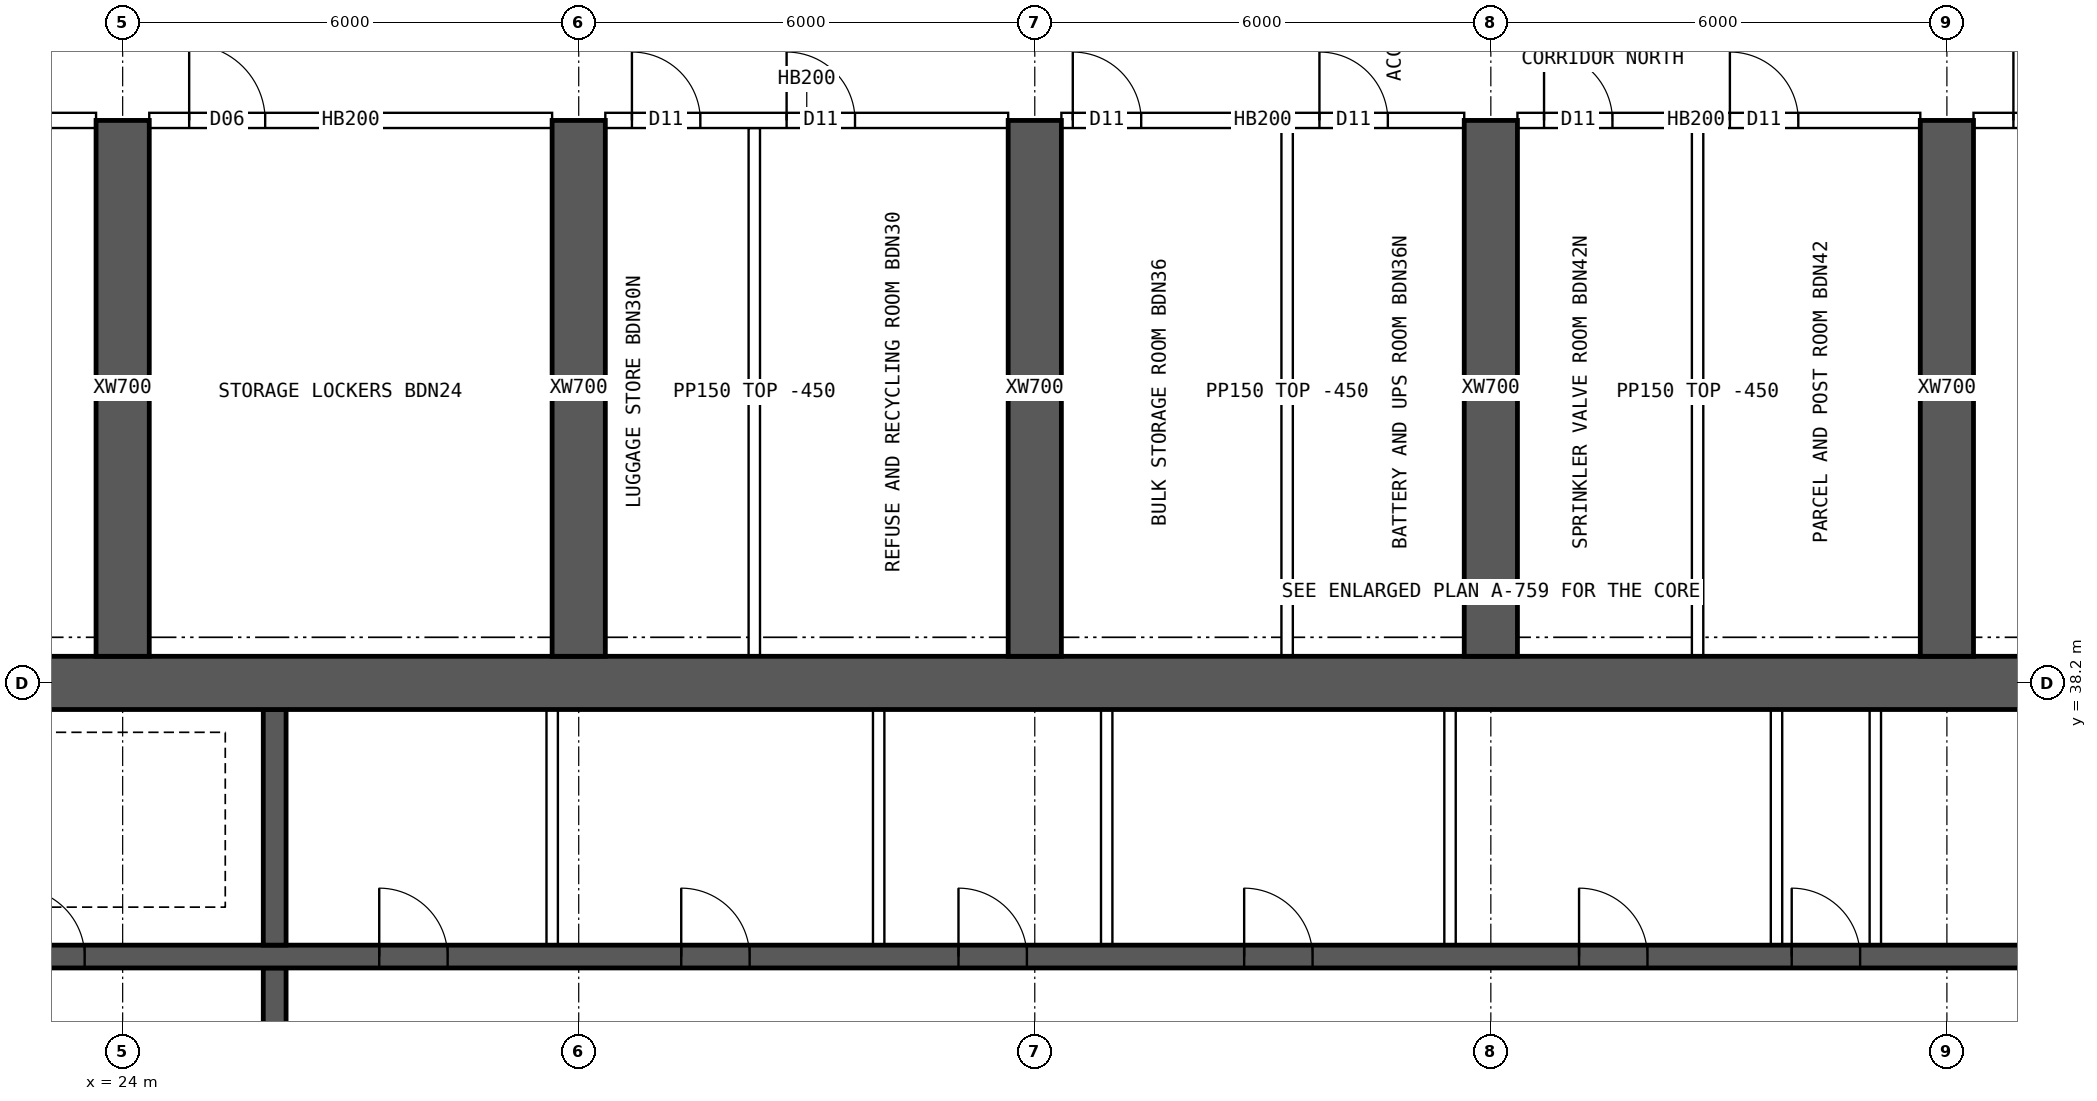
"""IFC4 building model, lengths in metres.
Left out: names, types, materials, properties, quantities, classifications, styles, units other than length and angle.
Written with IfcOpenShell. Run it as: python <this file> out.ifc"""

import sys

from ifc_helpers import new_model, si_unit, direction, frame, frame_2d, origin, place, context, subcontext, project, spatial, rectangle, extrude, element, fill, save


model = new_model("IFC4")
c1 = context("Model", 3, precision=1e-05, world=origin(), true_north=direction((0.0, 1.0)))
c2 = subcontext(c1, "Body", "Model", "MODEL_VIEW")
j1 = project(units=[si_unit("LENGTHUNIT", "METRE"), si_unit("PLANEANGLEUNIT", "RADIAN")], contexts=[c1])
p1 = place(None, origin())
s1 = spatial("IfcSite", under=j1, at=p1, CompositionType="ELEMENT")
p2 = place(p1, origin())
s2 = spatial("IfcBuilding", under=s1, at=p2, CompositionType="ELEMENT")
p3 = place(p2, frame((0.0, 0.0, 227.8)))
s3 = spatial("IfcBuildingStorey", under=s2, at=p3, CompositionType="ELEMENT", Elevation=227.8)
p4 = place(p3, frame((18.0, 38.2, 0.0), z_axis=(0.0, 0.0, 1.0), x_axis=(1.0, 0.0, 0.0)))
e1 = element("IfcWall", 1, at=p4, inside=s3, PredefinedType="SHEAR", context=c2, shape_type="SweptSolid", body=[
    extrude(rectangle(XDim=48.0, YDim=0.7, at=frame_2d((24.0, 0.0))), origin(), (0.0, 0.0, 1.0), 3.75),
])
p5 = place(p3, frame((18.35, 34.6, 0.0), z_axis=(0.0, 0.0, 1.0), x_axis=(1.0, 0.0, 0.0)))
e2 = element("IfcWall", 2, at=p5, inside=s3, PredefinedType="SHEAR", context=c2, shape_type="SweptSolid", body=[
    extrude(rectangle(XDim=47.3, YDim=0.3, at=frame_2d((23.65, 0.0))), origin(), (0.0, 0.0, 1.0), 3.75),
])
p6 = place(p5, frame((0.9, 0.0, 0.0)))
e3 = element("IfcOpeningElement", 3, at=p6, cuts=e2, PredefinedType="OPENING", context=c2, shape_type="SweptSolid", body=[
    extrude(rectangle(XDim=1.1, YDim=2.1, at=frame_2d((0.55, 1.05))), frame((0.0, 0.16, 0.0), z_axis=(0.0, -1.0, 0.0), x_axis=(1.0, 0.0, 0.0)), (0.0, 0.0, 1.0), 0.32),
])
p7 = place(p5, frame((45.3, 0.0, 0.0)))
e4 = element("IfcOpeningElement", 4, at=p7, cuts=e2, PredefinedType="OPENING", context=c2, shape_type="SweptSolid", body=[
    extrude(rectangle(XDim=1.1, YDim=2.1, at=frame_2d((0.55, 1.05))), frame((0.0, 0.16, 0.0), z_axis=(0.0, -1.0, 0.0), x_axis=(1.0, 0.0, 0.0)), (0.0, 0.0, 1.0), 0.32),
])
p8 = place(p5, frame((4.25, 0.0, 0.0)))
e5 = element("IfcOpeningElement", 5, at=p8, cuts=e2, PredefinedType="OPENING", context=c2, shape_type="SweptSolid", body=[
    extrude(rectangle(XDim=0.9, YDim=2.1, at=frame_2d((0.45, 1.05))), frame((0.0, 0.16, 0.0), z_axis=(0.0, -1.0, 0.0), x_axis=(1.0, 0.0, 0.0)), (0.0, 0.0, 1.0), 0.32),
])
p9 = place(p5, frame((42.15, 0.0, 0.0)))
e6 = element("IfcOpeningElement", 6, at=p9, cuts=e2, PredefinedType="OPENING", context=c2, shape_type="SweptSolid", body=[
    extrude(rectangle(XDim=0.9, YDim=2.1, at=frame_2d((0.45, 1.05))), frame((0.0, 0.16, 0.0), z_axis=(0.0, -1.0, 0.0), x_axis=(1.0, 0.0, 0.0)), (0.0, 0.0, 1.0), 0.32),
])
p10 = place(p5, frame((9.025, 0.0, 0.0)))
e7 = element("IfcOpeningElement", 7, at=p10, cuts=e2, PredefinedType="OPENING", context=c2, shape_type="SweptSolid", body=[
    extrude(rectangle(XDim=0.9, YDim=2.1, at=frame_2d((0.45, 1.05))), frame((0.0, 0.16, 0.0), z_axis=(0.0, -1.0, 0.0), x_axis=(1.0, 0.0, 0.0)), (0.0, 0.0, 1.0), 0.32),
])
p11 = place(p5, frame((12.999, 0.0, 0.0)))
e8 = element("IfcOpeningElement", 8, at=p11, cuts=e2, PredefinedType="OPENING", context=c2, shape_type="SweptSolid", body=[
    extrude(rectangle(XDim=0.9, YDim=2.1, at=frame_2d((0.45, 1.05))), frame((0.0, 0.16, 0.0), z_axis=(0.0, -1.0, 0.0), x_axis=(1.0, 0.0, 0.0)), (0.0, 0.0, 1.0), 0.32),
])
p12 = place(p5, frame((16.646, 0.0, 0.0)))
e9 = element("IfcOpeningElement", 9, at=p12, cuts=e2, PredefinedType="OPENING", context=c2, shape_type="SweptSolid", body=[
    extrude(rectangle(XDim=0.9, YDim=2.1, at=frame_2d((0.45, 1.05))), frame((0.0, 0.16, 0.0), z_axis=(0.0, -1.0, 0.0), x_axis=(1.0, 0.0, 0.0)), (0.0, 0.0, 1.0), 0.32),
])
p13 = place(p5, frame((20.405, 0.0, 0.0)))
e10 = element("IfcOpeningElement", 10, at=p13, cuts=e2, PredefinedType="OPENING", context=c2, shape_type="SweptSolid", body=[
    extrude(rectangle(XDim=0.9, YDim=2.1, at=frame_2d((0.45, 1.05))), frame((0.0, 0.16, 0.0), z_axis=(0.0, -1.0, 0.0), x_axis=(1.0, 0.0, 0.0)), (0.0, 0.0, 1.0), 0.32),
])
p14 = place(p5, frame((24.811, 0.0, 0.0)))
e11 = element("IfcOpeningElement", 11, at=p14, cuts=e2, PredefinedType="OPENING", context=c2, shape_type="SweptSolid", body=[
    extrude(rectangle(XDim=0.9, YDim=2.1, at=frame_2d((0.45, 1.05))), frame((0.0, 0.16, 0.0), z_axis=(0.0, -1.0, 0.0), x_axis=(1.0, 0.0, 0.0)), (0.0, 0.0, 1.0), 0.32),
])
p15 = place(p5, frame((27.608, 0.0, 0.0)))
e12 = element("IfcOpeningElement", 12, at=p15, cuts=e2, PredefinedType="OPENING", context=c2, shape_type="SweptSolid", body=[
    extrude(rectangle(XDim=0.9, YDim=2.1, at=frame_2d((0.45, 1.05))), frame((0.0, 0.16, 0.0), z_axis=(0.0, -1.0, 0.0), x_axis=(1.0, 0.0, 0.0)), (0.0, 0.0, 1.0), 0.32),
])
p16 = place(p5, frame((33.729, 0.0, 0.0)))
e13 = element("IfcOpeningElement", 13, at=p16, cuts=e2, PredefinedType="OPENING", context=c2, shape_type="SweptSolid", body=[
    extrude(rectangle(XDim=0.9, YDim=2.1, at=frame_2d((0.45, 1.05))), frame((0.0, 0.16, 0.0), z_axis=(0.0, -1.0, 0.0), x_axis=(1.0, 0.0, 0.0)), (0.0, 0.0, 1.0), 0.32),
])
p17 = place(p3, frame((26.0, 30.55, 0.0), z_axis=(0.0, 0.0, 1.0), x_axis=(0.0, 1.0, 0.0)))
e14 = element("IfcWall", 14, at=p17, inside=s3, PredefinedType="SHEAR", context=c2, shape_type="SweptSolid", body=[
    extrude(rectangle(XDim=3.9, YDim=0.3, at=frame_2d((1.95, 0.0))), origin(), (0.0, 0.0, 1.0), 3.75),
])
p18 = place(p17, frame((1.4, 0.0, 0.0)))
e15 = element("IfcOpeningElement", 15, at=p18, cuts=e14, PredefinedType="OPENING", context=c2, shape_type="SweptSolid", body=[
    extrude(rectangle(XDim=1.2, YDim=2.1, at=frame_2d((0.6, 1.05))), frame((0.0, 0.16, 0.0), z_axis=(0.0, -1.0, 0.0), x_axis=(1.0, 0.0, 0.0)), (0.0, 0.0, 1.0), 0.32),
])
p19 = place(p3, frame((26.0, 34.75, 0.0), z_axis=(0.0, 0.0, 1.0), x_axis=(0.0, 1.0, 0.0)))
e16 = element("IfcWall", 16, at=p19, inside=s3, PredefinedType="SHEAR", context=c2, shape_type="SweptSolid", body=[
    extrude(rectangle(XDim=3.1, YDim=0.3, at=frame_2d((1.55, 0.0))), origin(), (0.0, 0.0, 1.0), 3.75),
])
for number, where, z_axis, x_axis in (
    (17, (24.0, 38.55, 0.0), (0.0, 0.0, 1.0), (0.0, 1.0, 0.0)),
    (18, (30.0, 38.55, 0.0), (0.0, 0.0, 1.0), (0.0, 1.0, 0.0)),
    (19, (36.0, 38.55, 0.0), (0.0, 0.0, 1.0), (0.0, 1.0, 0.0)),
    (20, (42.0, 38.55, 0.0), (0.0, 0.0, 1.0), (0.0, 1.0, 0.0)),
    (21, (48.0, 38.55, 0.0), (0.0, 0.0, 1.0), (0.0, 1.0, 0.0)),
):
    element("IfcWall", number, at=place(p3, frame(where, z_axis=z_axis, x_axis=x_axis)), inside=s3, PredefinedType="SHEAR", context=c2, shape_type="SweptSolid", body=[
        extrude(rectangle(XDim=7.05, YDim=0.7, at=frame_2d((3.525, 0.0))), origin(), (0.0, 0.0, 1.0), 3.75),
    ])
for number, where, z_axis, x_axis in (
    (22, (29.651, 34.75, 0.0), (0.0, 0.0, 1.0), (0.0, 1.0, 0.0)),
    (23, (33.946, 34.75, 0.0), (0.0, 0.0, 1.0), (0.0, 1.0, 0.0)),
    (24, (36.946, 34.75, 0.0), (0.0, 0.0, 1.0), (0.0, 1.0, 0.0)),
    (25, (41.463, 34.75, 0.0), (0.0, 0.0, 1.0), (0.0, 1.0, 0.0)),
    (26, (45.758, 34.75, 0.0), (0.0, 0.0, 1.0), (0.0, 1.0, 0.0)),
    (27, (47.058, 34.75, 0.0), (0.0, 0.0, 1.0), (0.0, 1.0, 0.0)),
):
    element("IfcWall", number, at=place(p3, frame(where, z_axis=z_axis, x_axis=x_axis)), inside=s3, PredefinedType="SOLIDWALL", context=c2, shape_type="SweptSolid", body=[
        extrude(rectangle(XDim=3.1, YDim=0.15, at=frame_2d((1.55, 0.0))), origin(), (0.0, 0.0, 1.0), 3.3),
    ])
p20 = place(p3, frame((18.35, 45.6, 0.0), z_axis=(0.0, 0.0, 1.0), x_axis=(1.0, 0.0, 0.0)))
e28 = element("IfcWall", 28, at=p20, inside=s3, PredefinedType="SOLIDWALL", context=c2, shape_type="SweptSolid", body=[
    extrude(rectangle(XDim=5.3, YDim=0.2, at=frame_2d((2.65, 0.0))), origin(), (0.0, 0.0, 1.0), 3.3),
])
p21 = place(p20, frame((0.8, 0.0, 0.0)))
e29 = element("IfcOpeningElement", 29, at=p21, cuts=e28, PredefinedType="OPENING", context=c2, shape_type="SweptSolid", body=[
    extrude(rectangle(XDim=1.0, YDim=2.1, at=frame_2d((0.5, 1.05))), frame((0.0, 0.11, 0.0), z_axis=(0.0, -1.0, 0.0), x_axis=(1.0, 0.0, 0.0)), (0.0, 0.0, 1.0), 0.22),
])
p22 = place(p3, frame((24.35, 45.6, 0.0), z_axis=(0.0, 0.0, 1.0), x_axis=(1.0, 0.0, 0.0)))
e30 = element("IfcWall", 30, at=p22, inside=s3, PredefinedType="SOLIDWALL", context=c2, shape_type="SweptSolid", body=[
    extrude(rectangle(XDim=5.3, YDim=0.2, at=frame_2d((2.65, 0.0))), origin(), (0.0, 0.0, 1.0), 3.3),
])
p23 = place(p22, frame((0.525, 0.0, 0.0)))
e31 = element("IfcOpeningElement", 31, at=p23, cuts=e30, PredefinedType="OPENING", context=c2, shape_type="SweptSolid", body=[
    extrude(rectangle(XDim=1.0, YDim=2.1, at=frame_2d((0.5, 1.05))), frame((0.0, 0.11, 0.0), z_axis=(0.0, -1.0, 0.0), x_axis=(1.0, 0.0, 0.0)), (0.0, 0.0, 1.0), 0.22),
])
p24 = place(p3, frame((30.35, 45.6, 0.0), z_axis=(0.0, 0.0, 1.0), x_axis=(1.0, 0.0, 0.0)))
e32 = element("IfcWall", 32, at=p24, inside=s3, PredefinedType="SOLIDWALL", context=c2, shape_type="SweptSolid", body=[
    extrude(rectangle(XDim=5.3, YDim=0.2, at=frame_2d((2.65, 0.0))), origin(), (0.0, 0.0, 1.0), 3.3),
])
p25 = place(p24, frame((0.35, 0.0, 0.0)))
e33 = element("IfcOpeningElement", 33, at=p25, cuts=e32, PredefinedType="OPENING", context=c2, shape_type="SweptSolid", body=[
    extrude(rectangle(XDim=0.9, YDim=2.1, at=frame_2d((0.45, 1.05))), frame((0.0, 0.11, 0.0), z_axis=(0.0, -1.0, 0.0), x_axis=(1.0, 0.0, 0.0)), (0.0, 0.0, 1.0), 0.22),
])
p26 = place(p24, frame((2.385, 0.0, 0.0)))
e34 = element("IfcOpeningElement", 34, at=p26, cuts=e32, PredefinedType="OPENING", context=c2, shape_type="SweptSolid", body=[
    extrude(rectangle(XDim=0.9, YDim=2.1, at=frame_2d((0.45, 1.05))), frame((0.0, 0.11, 0.0), z_axis=(0.0, -1.0, 0.0), x_axis=(1.0, 0.0, 0.0)), (0.0, 0.0, 1.0), 0.22),
])
p27 = place(p3, frame((36.35, 45.6, 0.0), z_axis=(0.0, 0.0, 1.0), x_axis=(1.0, 0.0, 0.0)))
e35 = element("IfcWall", 35, at=p27, inside=s3, PredefinedType="SOLIDWALL", context=c2, shape_type="SweptSolid", body=[
    extrude(rectangle(XDim=5.3, YDim=0.2, at=frame_2d((2.65, 0.0))), origin(), (0.0, 0.0, 1.0), 3.3),
])
p28 = place(p27, frame((0.15, 0.0, 0.0)))
e36 = element("IfcOpeningElement", 36, at=p28, cuts=e35, PredefinedType="OPENING", context=c2, shape_type="SweptSolid", body=[
    extrude(rectangle(XDim=0.9, YDim=2.1, at=frame_2d((0.45, 1.05))), frame((0.0, 0.11, 0.0), z_axis=(0.0, -1.0, 0.0), x_axis=(1.0, 0.0, 0.0)), (0.0, 0.0, 1.0), 0.22),
])
p29 = place(p27, frame((3.395, 0.0, 0.0)))
e37 = element("IfcOpeningElement", 37, at=p29, cuts=e35, PredefinedType="OPENING", context=c2, shape_type="SweptSolid", body=[
    extrude(rectangle(XDim=0.9, YDim=2.1, at=frame_2d((0.45, 1.05))), frame((0.0, 0.11, 0.0), z_axis=(0.0, -1.0, 0.0), x_axis=(1.0, 0.0, 0.0)), (0.0, 0.0, 1.0), 0.22),
])
p30 = place(p3, frame((42.35, 45.6, 0.0), z_axis=(0.0, 0.0, 1.0), x_axis=(1.0, 0.0, 0.0)))
e38 = element("IfcWall", 38, at=p30, inside=s3, PredefinedType="SOLIDWALL", context=c2, shape_type="SweptSolid", body=[
    extrude(rectangle(XDim=5.3, YDim=0.2, at=frame_2d((2.65, 0.0))), origin(), (0.0, 0.0, 1.0), 3.3),
])
p31 = place(p30, frame((0.35, 0.0, 0.0)))
e39 = element("IfcOpeningElement", 39, at=p31, cuts=e38, PredefinedType="OPENING", context=c2, shape_type="SweptSolid", body=[
    extrude(rectangle(XDim=0.9, YDim=2.1, at=frame_2d((0.45, 1.05))), frame((0.0, 0.11, 0.0), z_axis=(0.0, -1.0, 0.0), x_axis=(1.0, 0.0, 0.0)), (0.0, 0.0, 1.0), 0.22),
])
p32 = place(p30, frame((2.795, 0.0, 0.0)))
e40 = element("IfcOpeningElement", 40, at=p32, cuts=e38, PredefinedType="OPENING", context=c2, shape_type="SweptSolid", body=[
    extrude(rectangle(XDim=0.9, YDim=2.1, at=frame_2d((0.45, 1.05))), frame((0.0, 0.11, 0.0), z_axis=(0.0, -1.0, 0.0), x_axis=(1.0, 0.0, 0.0)), (0.0, 0.0, 1.0), 0.22),
])
p33 = place(p3, frame((48.35, 45.6, 0.0), z_axis=(0.0, 0.0, 1.0), x_axis=(1.0, 0.0, 0.0)))
e41 = element("IfcWall", 41, at=p33, inside=s3, PredefinedType="SOLIDWALL", context=c2, shape_type="SweptSolid", body=[
    extrude(rectangle(XDim=5.3, YDim=0.2, at=frame_2d((2.65, 0.0))), origin(), (0.0, 0.0, 1.0), 3.3),
])
p34 = place(p33, frame((0.525, 0.0, 0.0)))
e42 = element("IfcOpeningElement", 42, at=p34, cuts=e41, PredefinedType="OPENING", context=c2, shape_type="SweptSolid", body=[
    extrude(rectangle(XDim=1.0, YDim=2.1, at=frame_2d((0.5, 1.05))), frame((0.0, 0.11, 0.0), z_axis=(0.0, -1.0, 0.0), x_axis=(1.0, 0.0, 0.0)), (0.0, 0.0, 1.0), 0.22),
])
for number, where, z_axis, x_axis in (
    (43, (32.31, 38.55, 0.0), (0.0, 0.0, 1.0), (0.0, 1.0, 0.0)),
    (44, (39.32, 38.55, 0.0), (0.0, 0.0, 1.0), (0.0, 1.0, 0.0)),
    (45, (44.72, 38.55, 0.0), (0.0, 0.0, 1.0), (0.0, 1.0, 0.0)),
):
    element("IfcWall", number, at=place(p3, frame(where, z_axis=z_axis, x_axis=x_axis)), inside=s3, PredefinedType="PARTITIONING", context=c2, shape_type="SweptSolid", body=[
        extrude(rectangle(XDim=6.95, YDim=0.15, at=frame_2d((3.475, 0.0))), origin(), (0.0, 0.0, 1.0), 3.3),
    ])
p35 = place(p8, origin())
e46 = element("IfcDoor", 46, at=p35, inside=s3, OperationType="SINGLE_SWING_LEFT", PredefinedType="DOOR", context=c2, shape_type="SweptSolid", body=[
    extrude(rectangle(XDim=0.9, YDim=2.1, at=frame_2d((0.45, 1.05))), frame((0.0, 0.025, 0.0), z_axis=(0.0, -1.0, 0.0), x_axis=(1.0, 0.0, 0.0)), (0.0, 0.0, 1.0), 0.05),
])
fill(e5, e46)
p36 = place(p10, origin())
e47 = element("IfcDoor", 47, at=p36, inside=s3, OperationType="SINGLE_SWING_LEFT", PredefinedType="DOOR", context=c2, shape_type="SweptSolid", body=[
    extrude(rectangle(XDim=0.9, YDim=2.1, at=frame_2d((0.45, 1.05))), frame((0.0, 0.025, 0.0), z_axis=(0.0, -1.0, 0.0), x_axis=(1.0, 0.0, 0.0)), (0.0, 0.0, 1.0), 0.05),
])
fill(e7, e47)
p37 = place(p11, origin())
e48 = element("IfcDoor", 48, at=p37, inside=s3, OperationType="SINGLE_SWING_LEFT", PredefinedType="DOOR", context=c2, shape_type="SweptSolid", body=[
    extrude(rectangle(XDim=0.9, YDim=2.1, at=frame_2d((0.45, 1.05))), frame((0.0, 0.025, 0.0), z_axis=(0.0, -1.0, 0.0), x_axis=(1.0, 0.0, 0.0)), (0.0, 0.0, 1.0), 0.05),
])
fill(e8, e48)
p38 = place(p12, origin())
e49 = element("IfcDoor", 49, at=p38, inside=s3, OperationType="SINGLE_SWING_LEFT", PredefinedType="DOOR", context=c2, shape_type="SweptSolid", body=[
    extrude(rectangle(XDim=0.9, YDim=2.1, at=frame_2d((0.45, 1.05))), frame((0.0, 0.025, 0.0), z_axis=(0.0, -1.0, 0.0), x_axis=(1.0, 0.0, 0.0)), (0.0, 0.0, 1.0), 0.05),
])
fill(e9, e49)
p39 = place(p13, origin())
e50 = element("IfcDoor", 50, at=p39, inside=s3, OperationType="SINGLE_SWING_LEFT", PredefinedType="DOOR", context=c2, shape_type="SweptSolid", body=[
    extrude(rectangle(XDim=0.9, YDim=2.1, at=frame_2d((0.45, 1.05))), frame((0.0, 0.025, 0.0), z_axis=(0.0, -1.0, 0.0), x_axis=(1.0, 0.0, 0.0)), (0.0, 0.0, 1.0), 0.05),
])
fill(e10, e50)
p40 = place(p14, origin())
e51 = element("IfcDoor", 51, at=p40, inside=s3, OperationType="SINGLE_SWING_LEFT", PredefinedType="DOOR", context=c2, shape_type="SweptSolid", body=[
    extrude(rectangle(XDim=0.9, YDim=2.1, at=frame_2d((0.45, 1.05))), frame((0.0, 0.025, 0.0), z_axis=(0.0, -1.0, 0.0), x_axis=(1.0, 0.0, 0.0)), (0.0, 0.0, 1.0), 0.05),
])
fill(e11, e51)
p41 = place(p15, origin())
e52 = element("IfcDoor", 52, at=p41, inside=s3, OperationType="SINGLE_SWING_LEFT", PredefinedType="DOOR", context=c2, shape_type="SweptSolid", body=[
    extrude(rectangle(XDim=0.9, YDim=2.1, at=frame_2d((0.45, 1.05))), frame((0.0, 0.025, 0.0), z_axis=(0.0, -1.0, 0.0), x_axis=(1.0, 0.0, 0.0)), (0.0, 0.0, 1.0), 0.05),
])
fill(e12, e52)
p42 = place(p23, origin())
e53 = element("IfcDoor", 53, at=p42, inside=s3, OperationType="SINGLE_SWING_LEFT", PredefinedType="DOOR", context=c2, shape_type="SweptSolid", body=[
    extrude(rectangle(XDim=1.0, YDim=2.1, at=frame_2d((0.5, 1.05))), frame((0.0, 0.025, 0.0), z_axis=(0.0, -1.0, 0.0), x_axis=(1.0, 0.0, 0.0)), (0.0, 0.0, 1.0), 0.05),
])
fill(e31, e53)
p43 = place(p25, origin())
e54 = element("IfcDoor", 54, at=p43, inside=s3, OperationType="SINGLE_SWING_LEFT", PredefinedType="DOOR", context=c2, shape_type="SweptSolid", body=[
    extrude(rectangle(XDim=0.9, YDim=2.1, at=frame_2d((0.45, 1.05))), frame((0.0, 0.025, 0.0), z_axis=(0.0, -1.0, 0.0), x_axis=(1.0, 0.0, 0.0)), (0.0, 0.0, 1.0), 0.05),
])
fill(e33, e54)
p44 = place(p26, origin())
e55 = element("IfcDoor", 55, at=p44, inside=s3, OperationType="SINGLE_SWING_LEFT", PredefinedType="DOOR", context=c2, shape_type="SweptSolid", body=[
    extrude(rectangle(XDim=0.9, YDim=2.1, at=frame_2d((0.45, 1.05))), frame((0.0, 0.025, 0.0), z_axis=(0.0, -1.0, 0.0), x_axis=(1.0, 0.0, 0.0)), (0.0, 0.0, 1.0), 0.05),
])
fill(e34, e55)
p45 = place(p28, origin())
e56 = element("IfcDoor", 56, at=p45, inside=s3, OperationType="SINGLE_SWING_LEFT", PredefinedType="DOOR", context=c2, shape_type="SweptSolid", body=[
    extrude(rectangle(XDim=0.9, YDim=2.1, at=frame_2d((0.45, 1.05))), frame((0.0, 0.025, 0.0), z_axis=(0.0, -1.0, 0.0), x_axis=(1.0, 0.0, 0.0)), (0.0, 0.0, 1.0), 0.05),
])
fill(e36, e56)
p46 = place(p29, origin())
e57 = element("IfcDoor", 57, at=p46, inside=s3, OperationType="SINGLE_SWING_LEFT", PredefinedType="DOOR", context=c2, shape_type="SweptSolid", body=[
    extrude(rectangle(XDim=0.9, YDim=2.1, at=frame_2d((0.45, 1.05))), frame((0.0, 0.025, 0.0), z_axis=(0.0, -1.0, 0.0), x_axis=(1.0, 0.0, 0.0)), (0.0, 0.0, 1.0), 0.05),
])
fill(e37, e57)
p47 = place(p31, origin())
e58 = element("IfcDoor", 58, at=p47, inside=s3, OperationType="SINGLE_SWING_LEFT", PredefinedType="DOOR", context=c2, shape_type="SweptSolid", body=[
    extrude(rectangle(XDim=0.9, YDim=2.1, at=frame_2d((0.45, 1.05))), frame((0.0, 0.025, 0.0), z_axis=(0.0, -1.0, 0.0), x_axis=(1.0, 0.0, 0.0)), (0.0, 0.0, 1.0), 0.05),
])
fill(e39, e58)
p48 = place(p32, origin())
e59 = element("IfcDoor", 59, at=p48, inside=s3, OperationType="SINGLE_SWING_LEFT", PredefinedType="DOOR", context=c2, shape_type="SweptSolid", body=[
    extrude(rectangle(XDim=0.9, YDim=2.1, at=frame_2d((0.45, 1.05))), frame((0.0, 0.025, 0.0), z_axis=(0.0, -1.0, 0.0), x_axis=(1.0, 0.0, 0.0)), (0.0, 0.0, 1.0), 0.05),
])
fill(e40, e59)
p49 = place(p34, origin())
e60 = element("IfcDoor", 60, at=p49, inside=s3, OperationType="SINGLE_SWING_LEFT", PredefinedType="DOOR", context=c2, shape_type="SweptSolid", body=[
    extrude(rectangle(XDim=1.0, YDim=2.1, at=frame_2d((0.5, 1.05))), frame((0.0, 0.025, 0.0), z_axis=(0.0, -1.0, 0.0), x_axis=(1.0, 0.0, 0.0)), (0.0, 0.0, 1.0), 0.05),
])
fill(e42, e60)
save(model, sys.argv[1])
